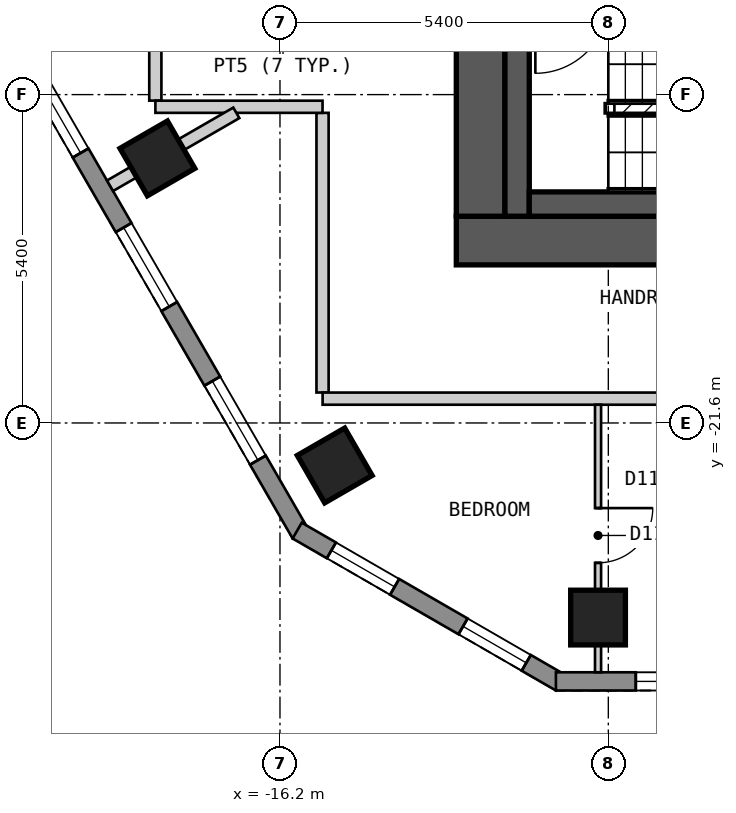
"""IFC4 building model, lengths in metres.
Left out: names, types, materials, properties, quantities, classifications, styles, units other than length and angle.
Written with IfcOpenShell. Run it as: python <this file> out.ifc"""

import sys

from ifc_helpers import new_model, si_unit, direction, frame, frame_2d, origin, origin_2d, place, context, subcontext, project, spatial, polyline, rectangle, outline, extrude, element, fill, save


model = new_model("IFC4")
c1 = context("Model", 3, precision=1e-05, world=origin(), true_north=direction((0.0, 1.0)))
c2 = subcontext(c1, "Body", "Model", "MODEL_VIEW")
j1 = project(units=[si_unit("LENGTHUNIT", "METRE"), si_unit("PLANEANGLEUNIT", "RADIAN")], contexts=[c1])
p1 = place(None, origin())
s1 = spatial("IfcSite", under=j1, at=p1, CompositionType="ELEMENT")
p2 = place(p1, origin())
s2 = spatial("IfcBuilding", under=s1, at=p2, CompositionType="ELEMENT")
p3 = place(p2, frame((0.0, 0.0, 138.6)))
s3 = spatial("IfcBuildingStorey", under=s2, at=p3, CompositionType="ELEMENT", Elevation=138.6)
for number, where, z_axis, x_axis in (
    (1, (-18.216, -17.249, 0.0), (0.0, 0.0, 1.0), (0.5, -0.866, 0.0)),
    (2, (-15.3, -22.299, 0.0), (0.0, 0.0, 1.0), (0.5, -0.866, 0.0)),
    (3, (-10.969, -24.8, 0.0), (0.0, 0.0, 1.0), (1.0, 0.0, 0.0)),
):
    element("IfcColumn", number, at=place(p3, frame(where, z_axis=z_axis, x_axis=x_axis)), inside=s3, PredefinedType="COLUMN", context=c2, shape_type="SweptSolid", body=[
        extrude(rectangle(XDim=0.9, YDim=0.9, at=origin_2d()), origin(), (0.0, 0.0, 1.0), 3.0),
    ])
p4 = place(p3, frame((-13.3, -18.6, 0.0), z_axis=(0.0, 0.0, 1.0), x_axis=(1.0, 0.0, 0.0)))
e4 = element("IfcWall", 4, at=p4, inside=s3, PredefinedType="SHEAR", context=c2, shape_type="SweptSolid", body=[
    extrude(rectangle(XDim=26.6, YDim=0.8, at=frame_2d((13.3, 0.0))), origin(), (0.0, 0.0, 1.0), 2.7),
])
p5 = place(p3, frame((-12.9, -18.2, 0.0), z_axis=(0.0, 0.0, 1.0), x_axis=(0.0, 1.0, 0.0)))
e5 = element("IfcWall", 5, at=p5, inside=s3, PredefinedType="SHEAR", context=c2, shape_type="SweptSolid", body=[
    extrude(rectangle(XDim=12.4, YDim=0.8, at=frame_2d((6.2, 0.0))), origin(), (0.0, 0.0, 1.0), 2.7),
])
p6 = place(p5, frame((4.0, 0.0, 0.0)))
e6 = element("IfcOpeningElement", 6, at=p6, cuts=e5, PredefinedType="OPENING", context=c2, shape_type="SweptSolid", body=[
    extrude(rectangle(XDim=1.2, YDim=2.1, at=frame_2d((0.6, 1.05))), frame((0.0, 0.41, 0.0), z_axis=(0.0, -1.0, 0.0), x_axis=(1.0, 0.0, 0.0)), (0.0, 0.0, 1.0), 0.82),
])
p7 = place(p3, frame((-28.218, -2.025, 0.0), z_axis=(0.0, 0.0, 1.0), x_axis=(0.500017503135, -0.866015298109, 0.0)))
e7 = element("IfcWall", 7, at=p7, inside=s3, PredefinedType="SOLIDWALL", context=c2, shape_type="SweptSolid", body=[
    extrude(outline(polyline([(0.0, -0.15), (24.711, -0.15), (24.631, 0.15), (0.08, 0.15), (0.0, -0.15)])), origin(), (0.0, 0.0, 1.0), 2.7),
])
p8 = place(p7, frame((1.4, 0.0, 0.15)))
e8 = element("IfcOpeningElement", 8, at=p8, cuts=e7, PredefinedType="OPENING", context=c2, shape_type="SweptSolid", body=[
    extrude(rectangle(XDim=1.5, YDim=2.1, at=frame_2d((0.75, 1.05))), frame((0.0, 0.16, 0.0), z_axis=(0.0, -1.0, 0.0), x_axis=(1.0, 0.0, 0.0)), (0.0, 0.0, 1.0), 0.32),
])
p9 = place(p7, frame((4.316, 0.0, 0.15)))
e9 = element("IfcOpeningElement", 9, at=p9, cuts=e7, PredefinedType="OPENING", context=c2, shape_type="SweptSolid", body=[
    extrude(rectangle(XDim=1.5, YDim=2.1, at=frame_2d((0.75, 1.05))), frame((0.0, 0.16, 0.0), z_axis=(0.0, -1.0, 0.0), x_axis=(1.0, 0.0, 0.0)), (0.0, 0.0, 1.0), 0.32),
])
p10 = place(p7, frame((7.231, 0.0, 0.15)))
e10 = element("IfcOpeningElement", 10, at=p10, cuts=e7, PredefinedType="OPENING", context=c2, shape_type="SweptSolid", body=[
    extrude(rectangle(XDim=1.5, YDim=2.1, at=frame_2d((0.75, 1.05))), frame((0.0, 0.16, 0.0), z_axis=(0.0, -1.0, 0.0), x_axis=(1.0, 0.0, 0.0)), (0.0, 0.0, 1.0), 0.32),
])
p11 = place(p7, frame((10.147, 0.0, 0.15)))
e11 = element("IfcOpeningElement", 11, at=p11, cuts=e7, PredefinedType="OPENING", context=c2, shape_type="SweptSolid", body=[
    extrude(rectangle(XDim=1.5, YDim=2.1, at=frame_2d((0.75, 1.05))), frame((0.0, 0.16, 0.0), z_axis=(0.0, -1.0, 0.0), x_axis=(1.0, 0.0, 0.0)), (0.0, 0.0, 1.0), 0.32),
])
p12 = place(p7, frame((13.062, 0.0, 0.15)))
e12 = element("IfcOpeningElement", 12, at=p12, cuts=e7, PredefinedType="OPENING", context=c2, shape_type="SweptSolid", body=[
    extrude(rectangle(XDim=1.5, YDim=2.1, at=frame_2d((0.75, 1.05))), frame((0.0, 0.16, 0.0), z_axis=(0.0, -1.0, 0.0), x_axis=(1.0, 0.0, 0.0)), (0.0, 0.0, 1.0), 0.32),
])
p13 = place(p7, frame((15.977, 0.0, 0.15)))
e13 = element("IfcOpeningElement", 13, at=p13, cuts=e7, PredefinedType="OPENING", context=c2, shape_type="SweptSolid", body=[
    extrude(rectangle(XDim=1.5, YDim=2.1, at=frame_2d((0.75, 1.05))), frame((0.0, 0.16, 0.0), z_axis=(0.0, -1.0, 0.0), x_axis=(1.0, 0.0, 0.0)), (0.0, 0.0, 1.0), 0.32),
])
p14 = place(p7, frame((18.893, 0.0, 0.15)))
e14 = element("IfcOpeningElement", 14, at=p14, cuts=e7, PredefinedType="OPENING", context=c2, shape_type="SweptSolid", body=[
    extrude(rectangle(XDim=1.5, YDim=2.1, at=frame_2d((0.75, 1.05))), frame((0.0, 0.16, 0.0), z_axis=(0.0, -1.0, 0.0), x_axis=(1.0, 0.0, 0.0)), (0.0, 0.0, 1.0), 0.32),
])
p15 = place(p7, frame((21.809, 0.0, 0.15)))
e15 = element("IfcOpeningElement", 15, at=p15, cuts=e7, PredefinedType="OPENING", context=c2, shape_type="SweptSolid", body=[
    extrude(rectangle(XDim=1.5, YDim=2.1, at=frame_2d((0.75, 1.05))), frame((0.0, 0.16, 0.0), z_axis=(0.0, -1.0, 0.0), x_axis=(1.0, 0.0, 0.0)), (0.0, 0.0, 1.0), 0.32),
])
p16 = place(p3, frame((-15.917, -23.37, 0.0), z_axis=(0.0, 0.0, 1.0), x_axis=(0.866022959057, -0.500004234368, 0.0)))
e16 = element("IfcWall", 16, at=p16, inside=s3, PredefinedType="SOLIDWALL", context=c2, shape_type="SweptSolid", body=[
    extrude(outline(polyline([(0.0, -0.15), (5.0, -0.15), (4.92, 0.15), (0.08, 0.15), (0.0, -0.15)])), origin(), (0.0, 0.0, 1.0), 2.7),
])
p17 = place(p16, frame((0.65, 0.0, 0.15)))
e17 = element("IfcOpeningElement", 17, at=p17, cuts=e16, PredefinedType="OPENING", context=c2, shape_type="SweptSolid", body=[
    extrude(rectangle(XDim=1.2, YDim=2.1, at=frame_2d((0.6, 1.05))), frame((0.0, 0.16, 0.0), z_axis=(0.0, -1.0, 0.0), x_axis=(1.0, 0.0, 0.0)), (0.0, 0.0, 1.0), 0.32),
])
p18 = place(p16, frame((3.15, 0.0, 0.15)))
e18 = element("IfcOpeningElement", 18, at=p18, cuts=e16, PredefinedType="OPENING", context=c2, shape_type="SweptSolid", body=[
    extrude(rectangle(XDim=1.2, YDim=2.1, at=frame_2d((0.6, 1.05))), frame((0.0, 0.16, 0.0), z_axis=(0.0, -1.0, 0.0), x_axis=(1.0, 0.0, 0.0)), (0.0, 0.0, 1.0), 0.32),
])
p19 = place(p3, frame((-11.662, -25.85, 0.0), z_axis=(0.0, 0.0, 1.0), x_axis=(1.0, 0.0, 0.0)))
e19 = element("IfcWall", 19, at=p19, inside=s3, PredefinedType="SOLIDWALL", context=c2, shape_type="SweptSolid", body=[
    extrude(outline(polyline([(0.0, -0.15), (23.324, -0.15), (23.244, 0.15), (0.08, 0.15), (0.0, -0.15)])), origin(), (0.0, 0.0, 1.0), 2.7),
])
p20 = place(p19, frame((1.314, 0.0, 0.15)))
e20 = element("IfcOpeningElement", 20, at=p20, cuts=e19, PredefinedType="OPENING", context=c2, shape_type="SweptSolid", body=[
    extrude(rectangle(XDim=1.5, YDim=2.1, at=frame_2d((0.75, 1.05))), frame((0.0, 0.16, 0.0), z_axis=(0.0, -1.0, 0.0), x_axis=(1.0, 0.0, 0.0)), (0.0, 0.0, 1.0), 0.32),
])
p21 = place(p19, frame((4.057, 0.0, 0.15)))
e21 = element("IfcOpeningElement", 21, at=p21, cuts=e19, PredefinedType="OPENING", context=c2, shape_type="SweptSolid", body=[
    extrude(rectangle(XDim=1.5, YDim=2.1, at=frame_2d((0.75, 1.05))), frame((0.0, 0.16, 0.0), z_axis=(0.0, -1.0, 0.0), x_axis=(1.0, 0.0, 0.0)), (0.0, 0.0, 1.0), 0.32),
])
p22 = place(p19, frame((6.799, 0.0, 0.15)))
e22 = element("IfcOpeningElement", 22, at=p22, cuts=e19, PredefinedType="OPENING", context=c2, shape_type="SweptSolid", body=[
    extrude(rectangle(XDim=1.5, YDim=2.1, at=frame_2d((0.75, 1.05))), frame((0.0, 0.16, 0.0), z_axis=(0.0, -1.0, 0.0), x_axis=(1.0, 0.0, 0.0)), (0.0, 0.0, 1.0), 0.32),
])
p23 = place(p19, frame((9.542, 0.0, 0.15)))
e23 = element("IfcOpeningElement", 23, at=p23, cuts=e19, PredefinedType="OPENING", context=c2, shape_type="SweptSolid", body=[
    extrude(rectangle(XDim=1.5, YDim=2.1, at=frame_2d((0.75, 1.05))), frame((0.0, 0.16, 0.0), z_axis=(0.0, -1.0, 0.0), x_axis=(1.0, 0.0, 0.0)), (0.0, 0.0, 1.0), 0.32),
])
p24 = place(p19, frame((12.284, 0.0, 0.15)))
e24 = element("IfcOpeningElement", 24, at=p24, cuts=e19, PredefinedType="OPENING", context=c2, shape_type="SweptSolid", body=[
    extrude(rectangle(XDim=1.5, YDim=2.1, at=frame_2d((0.75, 1.05))), frame((0.0, 0.16, 0.0), z_axis=(0.0, -1.0, 0.0), x_axis=(1.0, 0.0, 0.0)), (0.0, 0.0, 1.0), 0.32),
])
p25 = place(p19, frame((15.027, 0.0, 0.15)))
e25 = element("IfcOpeningElement", 25, at=p25, cuts=e19, PredefinedType="OPENING", context=c2, shape_type="SweptSolid", body=[
    extrude(rectangle(XDim=1.5, YDim=2.1, at=frame_2d((0.75, 1.05))), frame((0.0, 0.16, 0.0), z_axis=(0.0, -1.0, 0.0), x_axis=(1.0, 0.0, 0.0)), (0.0, 0.0, 1.0), 0.32),
])
p26 = place(p19, frame((17.769, 0.0, 0.15)))
e26 = element("IfcOpeningElement", 26, at=p26, cuts=e19, PredefinedType="OPENING", context=c2, shape_type="SweptSolid", body=[
    extrude(rectangle(XDim=1.5, YDim=2.1, at=frame_2d((0.75, 1.05))), frame((0.0, 0.16, 0.0), z_axis=(0.0, -1.0, 0.0), x_axis=(1.0, 0.0, 0.0)), (0.0, 0.0, 1.0), 0.32),
])
p27 = place(p19, frame((20.512, 0.0, 0.15)))
e27 = element("IfcOpeningElement", 27, at=p27, cuts=e19, PredefinedType="OPENING", context=c2, shape_type="SweptSolid", body=[
    extrude(rectangle(XDim=1.5, YDim=2.1, at=frame_2d((0.75, 1.05))), frame((0.0, 0.16, 0.0), z_axis=(0.0, -1.0, 0.0), x_axis=(1.0, 0.0, 0.0)), (0.0, 0.0, 1.0), 0.32),
])
p28 = place(p3, frame((-15.5, -16.5, 0.0), z_axis=(0.0, 0.0, 1.0), x_axis=(0.0, -1.0, 0.0)))
e28 = element("IfcWall", 28, at=p28, inside=s3, PredefinedType="PARTITIONING", context=c2, shape_type="SweptSolid", body=[
    extrude(rectangle(XDim=4.599, YDim=0.2, at=frame_2d((2.3, 0.0))), origin(), (0.0, 0.0, 1.0), 2.7),
])
p29 = place(p3, frame((-18.25, -10.593, 0.0), z_axis=(0.0, 0.0, 1.0), x_axis=(0.0, -1.0, 0.0)))
e29 = element("IfcWall", 29, at=p29, inside=s3, PredefinedType="PARTITIONING", context=c2, shape_type="SweptSolid", body=[
    extrude(rectangle(XDim=5.706, YDim=0.2, at=frame_2d((2.853, 0.0))), origin(), (0.0, 0.0, 1.0), 2.7),
])
p30 = place(p3, frame((-18.249, -16.4, 0.0), z_axis=(0.0, 0.0, 1.0), x_axis=(1.0, 0.0, 0.0)))
e30 = element("IfcWall", 30, at=p30, inside=s3, PredefinedType="PARTITIONING", context=c2, shape_type="SweptSolid", body=[
    extrude(rectangle(XDim=2.749, YDim=0.2, at=frame_2d((1.375, 0.0))), origin(), (0.0, 0.0, 1.0), 2.7),
])
p31 = place(p3, frame((-15.499, -21.2, 0.0), z_axis=(0.0, 0.0, 1.0), x_axis=(1.0, 0.0, 0.0)))
e31 = element("IfcWall", 31, at=p31, inside=s3, PredefinedType="PARTITIONING", context=c2, shape_type="SweptSolid", body=[
    extrude(rectangle(XDim=30.898, YDim=0.2, at=frame_2d((15.449, 0.0))), origin(), (0.0, 0.0, 1.0), 2.7),
])
p32 = place(p31, frame((6.773, 0.0, 0.0)))
e32 = element("IfcOpeningElement", 32, at=p32, cuts=e31, PredefinedType="OPENING", context=c2, shape_type="SweptSolid", body=[
    extrude(rectangle(XDim=1.0, YDim=2.1, at=frame_2d((0.5, 1.05))), frame((0.0, 0.11, 0.0), z_axis=(0.0, -1.0, 0.0), x_axis=(1.0, 0.0, 0.0)), (0.0, 0.0, 1.0), 0.22),
])
p33 = place(p31, frame((23.228, 0.0, 0.0)))
e33 = element("IfcOpeningElement", 33, at=p33, cuts=e31, PredefinedType="OPENING", context=c2, shape_type="SweptSolid", body=[
    extrude(rectangle(XDim=1.0, YDim=2.1, at=frame_2d((0.5, 1.05))), frame((0.0, 0.11, 0.0), z_axis=(0.0, -1.0, 0.0), x_axis=(1.0, 0.0, 0.0)), (0.0, 0.0, 1.0), 0.22),
])
p34 = place(p3, frame((-10.969, -25.7, 0.0), z_axis=(0.0, 0.0, 1.0), x_axis=(0.0, 1.0, 0.0)))
e34 = element("IfcWall", 34, at=p34, inside=s3, PredefinedType="PARTITIONING", context=c2, shape_type="SweptSolid", body=[
    extrude(rectangle(XDim=4.4, YDim=0.1, at=frame_2d((2.2, 0.0))), origin(), (0.0, 0.0, 1.0), 2.7),
])
p35 = place(p34, frame((1.8, 0.0, 0.0)))
e35 = element("IfcOpeningElement", 35, at=p35, cuts=e34, PredefinedType="OPENING", context=c2, shape_type="SweptSolid", body=[
    extrude(rectangle(XDim=0.9, YDim=2.1, at=frame_2d((0.45, 1.05))), frame((0.0, 0.06, 0.0), z_axis=(0.0, -1.0, 0.0), x_axis=(1.0, 0.0, 0.0)), (0.0, 0.0, 1.0), 0.12),
])
p36 = place(p3, frame((-18.995, -17.699, 0.0), z_axis=(0.0, 0.0, 1.0), x_axis=(0.86607371389, 0.499916315105, 0.0)))
e36 = element("IfcWall", 36, at=p36, inside=s3, PredefinedType="PARTITIONING", context=c2, shape_type="SweptSolid", body=[
    extrude(rectangle(XDim=2.398, YDim=0.2, at=frame_2d((1.199, 0.0))), origin(), (0.0, 0.0, 1.0), 2.7),
])
p37 = place(p3, frame((-12.3, -18.2, 0.0), z_axis=(0.0, 0.0, 1.0), x_axis=(0.0, 1.0, 0.0)))
e37 = element("IfcWall", 37, at=p37, inside=s3, PredefinedType="SOLIDWALL", context=c2, shape_type="SweptSolid", body=[
    extrude(rectangle(XDim=3.35, YDim=0.4, at=frame_2d((1.675, 0.0))), origin(), (0.0, 0.0, 1.0), 2.7),
])
p38 = place(p3, frame((-12.1, -18.0, 0.0), z_axis=(0.0, 0.0, 1.0), x_axis=(1.0, 0.0, 0.0)))
e38 = element("IfcWall", 38, at=p38, inside=s3, PredefinedType="SOLIDWALL", context=c2, shape_type="SweptSolid", body=[
    extrude(rectangle(XDim=5.4, YDim=0.4, at=frame_2d((2.7, 0.0))), origin(), (0.0, 0.0, 1.0), 2.7),
])
p39 = place(p13, origin())
e39 = element("IfcWindow", 39, at=p39, inside=s3, PartitioningType="SINGLE_PANEL", PredefinedType="WINDOW", context=c2, shape_type="SweptSolid", body=[
    extrude(rectangle(XDim=1.5, YDim=2.1, at=frame_2d((0.75, 1.05))), frame((0.0, 0.03, 0.0), z_axis=(0.0, -1.0, 0.0), x_axis=(1.0, 0.0, 0.0)), (0.0, 0.0, 1.0), 0.06),
])
fill(e13, e39)
p40 = place(p14, origin())
e40 = element("IfcWindow", 40, at=p40, inside=s3, PartitioningType="SINGLE_PANEL", PredefinedType="WINDOW", context=c2, shape_type="SweptSolid", body=[
    extrude(rectangle(XDim=1.5, YDim=2.1, at=frame_2d((0.75, 1.05))), frame((0.0, 0.03, 0.0), z_axis=(0.0, -1.0, 0.0), x_axis=(1.0, 0.0, 0.0)), (0.0, 0.0, 1.0), 0.06),
])
fill(e14, e40)
p41 = place(p15, origin())
e41 = element("IfcWindow", 41, at=p41, inside=s3, PartitioningType="SINGLE_PANEL", PredefinedType="WINDOW", context=c2, shape_type="SweptSolid", body=[
    extrude(rectangle(XDim=1.5, YDim=2.1, at=frame_2d((0.75, 1.05))), frame((0.0, 0.03, 0.0), z_axis=(0.0, -1.0, 0.0), x_axis=(1.0, 0.0, 0.0)), (0.0, 0.0, 1.0), 0.06),
])
fill(e15, e41)
p42 = place(p17, origin())
e42 = element("IfcWindow", 42, at=p42, inside=s3, PartitioningType="SINGLE_PANEL", PredefinedType="WINDOW", context=c2, shape_type="SweptSolid", body=[
    extrude(rectangle(XDim=1.2, YDim=2.1, at=frame_2d((0.6, 1.05))), frame((0.0, 0.03, 0.0), z_axis=(0.0, -1.0, 0.0), x_axis=(1.0, 0.0, 0.0)), (0.0, 0.0, 1.0), 0.06),
])
fill(e17, e42)
p43 = place(p18, origin())
e43 = element("IfcWindow", 43, at=p43, inside=s3, PartitioningType="SINGLE_PANEL", PredefinedType="WINDOW", context=c2, shape_type="SweptSolid", body=[
    extrude(rectangle(XDim=1.2, YDim=2.1, at=frame_2d((0.6, 1.05))), frame((0.0, 0.03, 0.0), z_axis=(0.0, -1.0, 0.0), x_axis=(1.0, 0.0, 0.0)), (0.0, 0.0, 1.0), 0.06),
])
fill(e18, e43)
p44 = place(p20, origin())
e44 = element("IfcWindow", 44, at=p44, inside=s3, PartitioningType="SINGLE_PANEL", PredefinedType="WINDOW", context=c2, shape_type="SweptSolid", body=[
    extrude(rectangle(XDim=1.5, YDim=2.1, at=frame_2d((0.75, 1.05))), frame((0.0, 0.03, 0.0), z_axis=(0.0, -1.0, 0.0), x_axis=(1.0, 0.0, 0.0)), (0.0, 0.0, 1.0), 0.06),
])
fill(e20, e44)
p45 = place(p35, origin())
e45 = element("IfcDoor", 45, at=p45, inside=s3, OperationType="SINGLE_SWING_RIGHT", PredefinedType="DOOR", context=c2, shape_type="SweptSolid", body=[
    extrude(rectangle(XDim=0.9, YDim=2.1, at=frame_2d((0.45, 1.05))), frame((0.0, 0.025, 0.0), z_axis=(0.0, -1.0, 0.0), x_axis=(1.0, 0.0, 0.0)), (0.0, 0.0, 1.0), 0.05),
])
fill(e35, e45)
save(model, sys.argv[1])
